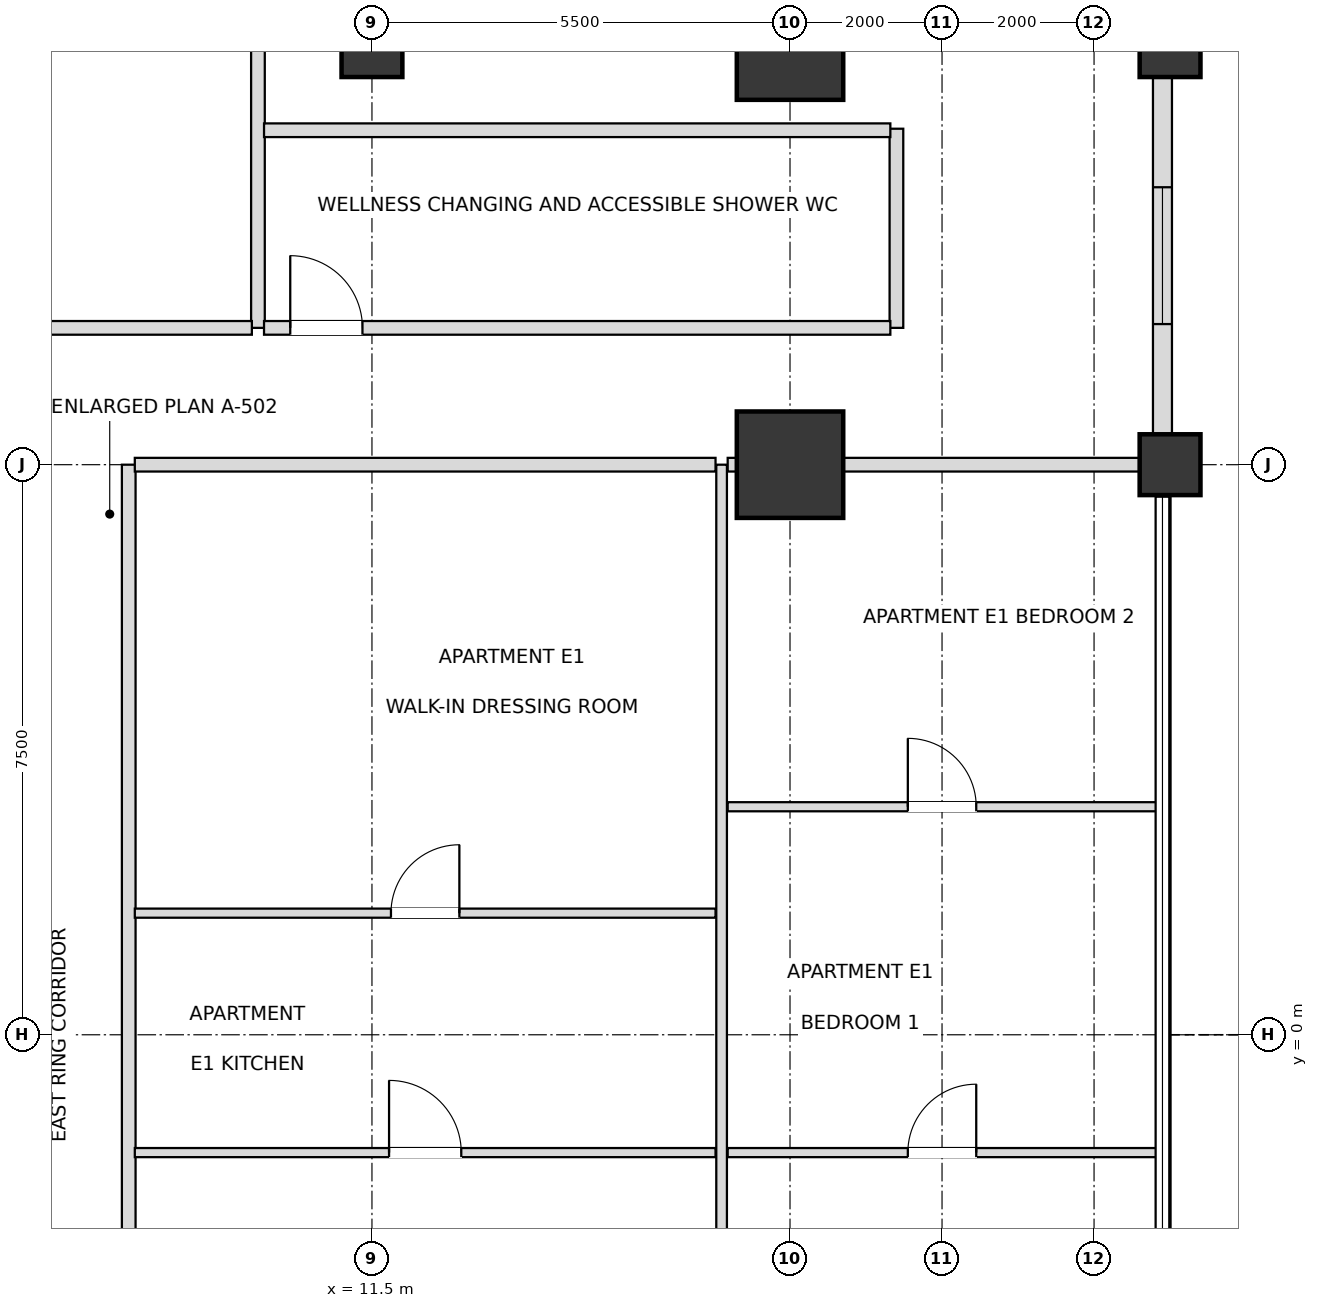
"""IFC4 building model, lengths in metres.
Left out: names, types, materials, properties, quantities, classifications, styles, units other than length and angle.
Written with IfcOpenShell. Run it as: python <this file> out.ifc"""

import sys

from ifc_helpers import new_model, si_unit, direction, frame, frame_2d, origin, origin_2d, place, context, subcontext, project, spatial, rectangle, extrude, element, fill, save


model = new_model("IFC4")
c1 = context("Model", 3, precision=1e-05, world=origin(), true_north=direction((0.0, 1.0)))
c2 = subcontext(c1, "Body", "Model", "MODEL_VIEW")
j1 = project(units=[si_unit("LENGTHUNIT", "METRE"), si_unit("PLANEANGLEUNIT", "RADIAN")], contexts=[c1])
p1 = place(None, origin())
s1 = spatial("IfcSite", under=j1, at=p1, CompositionType="ELEMENT")
p2 = place(p1, origin())
s2 = spatial("IfcBuilding", under=s1, at=p2, CompositionType="ELEMENT")
p3 = place(p2, frame((0.0, 0.0, 50.4)))
s3 = spatial("IfcBuildingStorey", under=s2, at=p3, CompositionType="ELEMENT", Elevation=50.4)
for number, where, z_axis, x_axis in (
    (1, (17.0, 7.5, 0.0), (0.0, 0.0, 1.0), (1.0, 0.0, 0.0)),
    (2, (17.0, 13.0, 0.0), (0.0, 0.0, 1.0), (1.0, 0.0, 0.0)),
):
    element("IfcColumn", number, at=place(p3, frame(where, z_axis=z_axis, x_axis=x_axis)), inside=s3, PredefinedType="USERDEFINED", context=c2, shape_type="SweptSolid", body=[
        extrude(rectangle(XDim=1.4, YDim=1.4, at=origin_2d()), origin(), (0.0, 0.0, 1.0), 3.6),
    ])
for number, where, z_axis, x_axis in (
    (3, (11.5, 13.0, 0.0), (0.0, 0.0, 1.0), (1.0, 0.0, 0.0)),
    (4, (22.0, 7.5, 0.0), (0.0, 0.0, 1.0), (1.0, 0.0, 0.0)),
    (5, (22.0, 13.0, 0.0), (0.0, 0.0, 1.0), (1.0, 0.0, 0.0)),
):
    element("IfcColumn", number, at=place(p3, frame(where, z_axis=z_axis, x_axis=x_axis)), inside=s3, PredefinedType="COLUMN", context=c2, shape_type="SweptSolid", body=[
        extrude(rectangle(XDim=0.8, YDim=0.8, at=origin_2d()), origin(), (0.0, 0.0, 1.0), 3.6),
    ])
p4 = place(p3, frame((21.9, 7.895, 0.0), z_axis=(0.0, 0.0, 1.0), x_axis=(0.0, 1.0, 0.0)))
e6 = element("IfcWall", 6, at=p4, inside=s3, PredefinedType="SOLIDWALL", context=c2, shape_type="SweptSolid", body=[
    extrude(rectangle(XDim=4.71, YDim=0.25, at=frame_2d((2.355, 0.0))), origin(), (0.0, 0.0, 1.0), 2.736),
])
p5 = place(p4, frame((1.455, 0.0, 0.72)))
e7 = element("IfcOpeningElement", 7, at=p5, cuts=e6, PredefinedType="OPENING", context=c2, shape_type="SweptSolid", body=[
    extrude(rectangle(XDim=1.8, YDim=1.68, at=frame_2d((0.9, 0.84))), frame((0.0, 0.135, 0.0), z_axis=(0.0, -1.0, 0.0), x_axis=(1.0, 0.0, 0.0)), (0.0, 0.0, 1.0), 0.27),
])
p6 = place(p3, frame((8.3, -7.5, 0.0), z_axis=(0.0, 0.0, 1.0), x_axis=(0.0, 1.0, 0.0)))
e8 = element("IfcWall", 8, at=p6, inside=s3, PredefinedType="PARTITIONING", context=c2, shape_type="SweptSolid", body=[
    extrude(rectangle(XDim=15.0, YDim=0.18, at=frame_2d((7.5, 0.0))), origin(), (0.0, 0.0, 1.0), 3.38),
])
p7 = place(p6, frame((3.475, 0.0, 0.0)))
e9 = element("IfcOpeningElement", 9, at=p7, cuts=e8, PredefinedType="OPENING", context=c2, shape_type="SweptSolid", body=[
    extrude(rectangle(XDim=0.95, YDim=2.15, at=frame_2d((0.475, 1.075))), frame((0.0, 0.1, 0.0), z_axis=(0.0, -1.0, 0.0), x_axis=(1.0, 0.0, 0.0)), (0.0, 0.0, 1.0), 0.2),
])
p8 = place(p3, frame((10.0, 9.3, 0.0), z_axis=(0.0, 0.0, 1.0), x_axis=(0.0, 1.0, 0.0)))
e10 = element("IfcWall", 10, at=p8, inside=s3, PredefinedType="PARTITIONING", context=c2, shape_type="SweptSolid", body=[
    extrude(rectangle(XDim=15.6, YDim=0.18, at=frame_2d((7.8, 0.0))), origin(), (0.0, 0.0, 1.0), 2.816),
])
p9 = place(p8, frame((8.635, 0.0, 0.0)))
e11 = element("IfcOpeningElement", 11, at=p9, cuts=e10, PredefinedType="OPENING", context=c2, shape_type="SweptSolid", body=[
    extrude(rectangle(XDim=0.95, YDim=2.15, at=frame_2d((0.475, 1.075))), frame((0.0, 0.1, 0.0), z_axis=(0.0, -1.0, 0.0), x_axis=(1.0, 0.0, 0.0)), (0.0, 0.0, 1.0), 0.2),
])
p10 = place(p3, frame((16.1, -7.5, 0.0), z_axis=(0.0, 0.0, 1.0), x_axis=(0.0, 1.0, 0.0)))
e12 = element("IfcWall", 12, at=p10, inside=s3, PredefinedType="PARTITIONING", context=c2, shape_type="SweptSolid", body=[
    extrude(rectangle(XDim=15.0, YDim=0.14, at=frame_2d((7.5, 0.0))), origin(), (0.0, 0.0, 1.0), 3.38),
])
p11 = place(p10, frame((3.475, 0.0, 0.0)))
e13 = element("IfcOpeningElement", 13, at=p11, cuts=e12, PredefinedType="OPENING", context=c2, shape_type="SweptSolid", body=[
    extrude(rectangle(XDim=0.95, YDim=2.1, at=frame_2d((0.475, 1.05))), frame((0.0, 0.08, 0.0), z_axis=(0.0, -1.0, 0.0), x_axis=(1.0, 0.0, 0.0)), (0.0, 0.0, 1.0), 0.16),
])
p12 = place(p3, frame((18.4, 9.3, 0.0), z_axis=(0.0, 0.0, 1.0), x_axis=(0.0, 1.0, 0.0)))
e14 = element("IfcWall", 14, at=p12, inside=s3, PredefinedType="PARTITIONING", context=c2, shape_type="SweptSolid", body=[
    extrude(rectangle(XDim=2.62, YDim=0.18, at=frame_2d((1.31, 0.0))), origin(), (0.0, 0.0, 1.0), 3.38),
])
p13 = place(p3, frame((8.38, -1.55, 0.0), z_axis=(0.0, 0.0, 1.0), x_axis=(1.0, 0.0, 0.0)))
e15 = element("IfcWall", 15, at=p13, inside=s3, PredefinedType="PARTITIONING", context=c2, shape_type="SweptSolid", body=[
    extrude(rectangle(XDim=7.64, YDim=0.12, at=frame_2d((3.82, 0.0))), origin(), (0.0, 0.0, 1.0), 2.948),
])
p14 = place(p13, frame((3.345, 0.0, 0.0)))
e16 = element("IfcOpeningElement", 16, at=p14, cuts=e15, PredefinedType="OPENING", context=c2, shape_type="SweptSolid", body=[
    extrude(rectangle(XDim=0.95, YDim=2.1, at=frame_2d((0.475, 1.05))), frame((0.0, 0.07, 0.0), z_axis=(0.0, -1.0, 0.0), x_axis=(1.0, 0.0, 0.0)), (0.0, 0.0, 1.0), 0.14),
])
p15 = place(p3, frame((16.18, -1.55, 0.0), z_axis=(0.0, 0.0, 1.0), x_axis=(1.0, 0.0, 0.0)))
e17 = element("IfcWall", 17, at=p15, inside=s3, PredefinedType="PARTITIONING", context=c2, shape_type="SweptSolid", body=[
    extrude(rectangle(XDim=5.64, YDim=0.12, at=frame_2d((2.82, 0.0))), origin(), (0.0, 0.0, 1.0), 2.816),
])
p16 = place(p15, frame((2.37, 0.0, 0.0)))
e18 = element("IfcOpeningElement", 18, at=p16, cuts=e17, PredefinedType="OPENING", context=c2, shape_type="SweptSolid", body=[
    extrude(rectangle(XDim=0.9, YDim=2.1, at=frame_2d((0.45, 1.05))), frame((0.0, 0.07, 0.0), z_axis=(0.0, -1.0, 0.0), x_axis=(1.0, 0.0, 0.0)), (0.0, 0.0, 1.0), 0.14),
])
p17 = place(p3, frame((8.38, 1.6, 0.0), z_axis=(0.0, 0.0, 1.0), x_axis=(1.0, 0.0, 0.0)))
e19 = element("IfcWall", 19, at=p17, inside=s3, PredefinedType="PARTITIONING", context=c2, shape_type="SweptSolid", body=[
    extrude(rectangle(XDim=7.64, YDim=0.12, at=frame_2d((3.82, 0.0))), origin(), (0.0, 0.0, 1.0), 2.948),
])
p18 = place(p17, frame((3.37, 0.0, 0.0)))
e20 = element("IfcOpeningElement", 20, at=p18, cuts=e19, PredefinedType="OPENING", context=c2, shape_type="SweptSolid", body=[
    extrude(rectangle(XDim=0.9, YDim=2.1, at=frame_2d((0.45, 1.05))), frame((0.0, 0.07, 0.0), z_axis=(0.0, -1.0, 0.0), x_axis=(1.0, 0.0, 0.0)), (0.0, 0.0, 1.0), 0.14),
])
p19 = place(p3, frame((16.18, 3.0, 0.0), z_axis=(0.0, 0.0, 1.0), x_axis=(1.0, 0.0, 0.0)))
e21 = element("IfcWall", 21, at=p19, inside=s3, PredefinedType="PARTITIONING", context=c2, shape_type="SweptSolid", body=[
    extrude(rectangle(XDim=5.64, YDim=0.12, at=frame_2d((2.82, 0.0))), origin(), (0.0, 0.0, 1.0), 2.816),
])
p20 = place(p19, frame((2.37, 0.0, 0.0)))
e22 = element("IfcOpeningElement", 22, at=p20, cuts=e21, PredefinedType="OPENING", context=c2, shape_type="SweptSolid", body=[
    extrude(rectangle(XDim=0.9, YDim=2.1, at=frame_2d((0.45, 1.05))), frame((0.0, 0.07, 0.0), z_axis=(0.0, -1.0, 0.0), x_axis=(1.0, 0.0, 0.0)), (0.0, 0.0, 1.0), 0.14),
])
p21 = place(p3, frame((8.38, 7.5, 0.0), z_axis=(0.0, 0.0, 1.0), x_axis=(1.0, 0.0, 0.0)))
e23 = element("IfcWall", 23, at=p21, inside=s3, PredefinedType="PARTITIONING", context=c2, shape_type="SweptSolid", body=[
    extrude(rectangle(XDim=7.64, YDim=0.18, at=frame_2d((3.82, 0.0))), origin(), (0.0, 0.0, 1.0), 2.816),
])
p22 = place(p3, frame((16.18, 7.5, 0.0), z_axis=(0.0, 0.0, 1.0), x_axis=(1.0, 0.0, 0.0)))
e24 = element("IfcWall", 24, at=p22, inside=s3, PredefinedType="PARTITIONING", context=c2, shape_type="SweptSolid", body=[
    extrude(rectangle(XDim=5.72, YDim=0.18, at=frame_2d((2.86, 0.0))), origin(), (0.0, 0.0, 1.0), 2.816),
])
p23 = place(p3, frame((-2.87, 9.3, 0.0), z_axis=(0.0, 0.0, 1.0), x_axis=(1.0, 0.0, 0.0)))
e25 = element("IfcWall", 25, at=p23, inside=s3, PredefinedType="PARTITIONING", context=c2, shape_type="SweptSolid", body=[
    extrude(rectangle(XDim=12.79, YDim=0.18, at=frame_2d((6.395, 0.0))), origin(), (0.0, 0.0, 1.0), 2.816),
])
p24 = place(p23, frame((5.925, 0.0, 0.0)))
e26 = element("IfcOpeningElement", 26, at=p24, cuts=e25, PredefinedType="OPENING", context=c2, shape_type="SweptSolid", body=[
    extrude(rectangle(XDim=0.95, YDim=2.15, at=frame_2d((0.475, 1.075))), frame((0.0, 0.1, 0.0), z_axis=(0.0, -1.0, 0.0), x_axis=(1.0, 0.0, 0.0)), (0.0, 0.0, 1.0), 0.2),
])
p25 = place(p3, frame((10.08, 9.3, 0.0), z_axis=(0.0, 0.0, 1.0), x_axis=(1.0, 0.0, 0.0)))
e27 = element("IfcWall", 27, at=p25, inside=s3, PredefinedType="PARTITIONING", context=c2, shape_type="SweptSolid", body=[
    extrude(rectangle(XDim=8.24, YDim=0.18, at=frame_2d((4.12, 0.0))), origin(), (0.0, 0.0, 1.0), 2.816),
])
p26 = place(p25, frame((0.345, 0.0, 0.0)))
e28 = element("IfcOpeningElement", 28, at=p26, cuts=e27, PredefinedType="OPENING", context=c2, shape_type="SweptSolid", body=[
    extrude(rectangle(XDim=0.95, YDim=2.15, at=frame_2d((0.475, 1.075))), frame((0.0, 0.1, 0.0), z_axis=(0.0, -1.0, 0.0), x_axis=(1.0, 0.0, 0.0)), (0.0, 0.0, 1.0), 0.2),
])
p27 = place(p3, frame((10.08, 11.9, 0.0), z_axis=(0.0, 0.0, 1.0), x_axis=(1.0, 0.0, 0.0)))
e29 = element("IfcWall", 29, at=p27, inside=s3, PredefinedType="PARTITIONING", context=c2, shape_type="SweptSolid", body=[
    extrude(rectangle(XDim=8.24, YDim=0.18, at=frame_2d((4.12, 0.0))), origin(), (0.0, 0.0, 1.0), 2.816),
])
p28 = place(p5, origin())
e30 = element("IfcWindow", 30, at=p28, inside=s3, PartitioningType="SINGLE_PANEL", PredefinedType="WINDOW", context=c2, shape_type="SweptSolid", body=[
    extrude(rectangle(XDim=1.8, YDim=1.68, at=frame_2d((0.9, 0.84))), frame((0.0, 0.03, 0.0), z_axis=(0.0, -1.0, 0.0), x_axis=(1.0, 0.0, 0.0)), (0.0, 0.0, 1.0), 0.06),
])
fill(e7, e30)
p29 = place(p26, origin())
e31 = element("IfcDoor", 31, at=p29, inside=s3, OperationType="SINGLE_SWING_LEFT", PredefinedType="DOOR", context=c2, shape_type="SweptSolid", body=[
    extrude(rectangle(XDim=0.95, YDim=2.15, at=frame_2d((0.475, 1.075))), frame((0.0, 0.025, 0.0), z_axis=(0.0, -1.0, 0.0), x_axis=(1.0, 0.0, 0.0)), (0.0, 0.0, 1.0), 0.05),
])
fill(e28, e31)
p30 = place(p14, origin())
e32 = element("IfcDoor", 32, at=p30, inside=s3, OperationType="SINGLE_SWING_LEFT", PredefinedType="DOOR", context=c2, shape_type="SweptSolid", body=[
    extrude(rectangle(XDim=0.95, YDim=2.1, at=frame_2d((0.475, 1.05))), frame((0.0, 0.025, 0.0), z_axis=(0.0, -1.0, 0.0), x_axis=(1.0, 0.0, 0.0)), (0.0, 0.0, 1.0), 0.05),
])
fill(e16, e32)
p31 = place(p18, origin())
e33 = element("IfcDoor", 33, at=p31, inside=s3, OperationType="SINGLE_SWING_RIGHT", PredefinedType="DOOR", context=c2, shape_type="SweptSolid", body=[
    extrude(rectangle(XDim=0.9, YDim=2.1, at=frame_2d((0.45, 1.05))), frame((0.0, 0.025, 0.0), z_axis=(0.0, -1.0, 0.0), x_axis=(1.0, 0.0, 0.0)), (0.0, 0.0, 1.0), 0.05),
])
fill(e20, e33)
p32 = place(p16, origin())
e34 = element("IfcDoor", 34, at=p32, inside=s3, OperationType="SINGLE_SWING_RIGHT", PredefinedType="DOOR", context=c2, shape_type="SweptSolid", body=[
    extrude(rectangle(XDim=0.9, YDim=2.1, at=frame_2d((0.45, 1.05))), frame((0.0, 0.025, 0.0), z_axis=(0.0, -1.0, 0.0), x_axis=(1.0, 0.0, 0.0)), (0.0, 0.0, 1.0), 0.05),
])
fill(e18, e34)
p33 = place(p20, origin())
e35 = element("IfcDoor", 35, at=p33, inside=s3, OperationType="SINGLE_SWING_LEFT", PredefinedType="DOOR", context=c2, shape_type="SweptSolid", body=[
    extrude(rectangle(XDim=0.9, YDim=2.1, at=frame_2d((0.45, 1.05))), frame((0.0, 0.025, 0.0), z_axis=(0.0, -1.0, 0.0), x_axis=(1.0, 0.0, 0.0)), (0.0, 0.0, 1.0), 0.05),
])
fill(e22, e35)
save(model, sys.argv[1])
